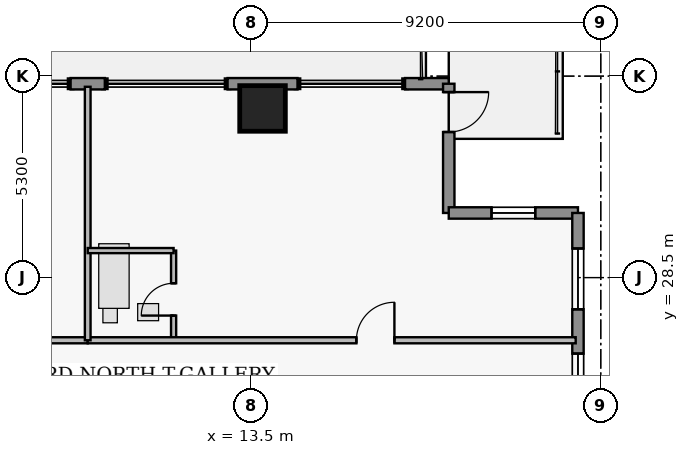
"""IFC4 building model, lengths in metres.
Left out: names, types, materials, properties, quantities, classifications, styles, units other than length and angle.
Written with IfcOpenShell. Run it as: python <this file> out.ifc"""

import sys

from ifc_helpers import new_model, si_unit, direction, frame, frame_2d, origin, origin_2d, place, context, subcontext, project, spatial, rectangle, extrude, element, fill, save


model = new_model("IFC4")
c1 = context("Model", 3, precision=1e-05, world=origin(), true_north=direction((0.0, 1.0)))
c2 = subcontext(c1, "Body", "Model", "MODEL_VIEW")
j1 = project(units=[si_unit("LENGTHUNIT", "METRE"), si_unit("PLANEANGLEUNIT", "RADIAN")], contexts=[c1])
p1 = place(None, origin())
s1 = spatial("IfcSite", under=j1, at=p1, CompositionType="ELEMENT")
p2 = place(p1, origin())
s2 = spatial("IfcBuilding", under=s1, at=p2, CompositionType="ELEMENT")
p3 = place(p2, frame((0.0, 0.0, 214.9)))
s3 = spatial("IfcBuildingStorey", under=s2, at=p3, CompositionType="ELEMENT", Elevation=214.9)
p4 = place(p3, frame((13.8, 32.95, 0.0), z_axis=(0.0, 0.0, 1.0), x_axis=(1.0, 0.0, 0.0)))
e1 = element("IfcColumn", 1, at=p4, inside=s3, PredefinedType="COLUMN", context=c2, shape_type="SweptSolid", body=[
    extrude(rectangle(XDim=1.2, YDim=1.2, at=origin_2d()), origin(), (0.0, 0.0, 1.0), 3.75),
])
p5 = place(p3, frame((8.75, 33.6, 0.0), z_axis=(0.0, 0.0, 1.0), x_axis=(1.0, 0.0, 0.0)))
e2 = element("IfcWall", 2, at=p5, inside=s3, PredefinedType="STANDARD", context=c2, shape_type="SweptSolid", body=[
    extrude(rectangle(XDim=0.9, YDim=0.3, at=frame_2d((0.45, 0.0))), origin(), (0.0, 0.0, 1.0), 3.53),
])
p6 = place(p3, frame((12.88, 33.6, 0.0), z_axis=(0.0, 0.0, 1.0), x_axis=(1.0, 0.0, 0.0)))
e3 = element("IfcWall", 3, at=p6, inside=s3, PredefinedType="STANDARD", context=c2, shape_type="SweptSolid", body=[
    extrude(rectangle(XDim=1.84, YDim=0.3, at=frame_2d((0.92, 0.0))), origin(), (0.0, 0.0, 1.0), 3.53),
])
p7 = place(p3, frame((17.55, 33.6, 0.0), z_axis=(0.0, 0.0, 1.0), x_axis=(1.0, 0.0, 0.0)))
e4 = element("IfcWall", 4, at=p7, inside=s3, PredefinedType="STANDARD", context=c2, shape_type="SweptSolid", body=[
    extrude(rectangle(XDim=1.15, YDim=0.3, at=frame_2d((0.575, 0.0))), origin(), (0.0, 0.0, 1.0), 3.53),
])
p8 = place(p3, frame((18.7, 33.6, 0.0), z_axis=(0.0, 0.0, 1.0), x_axis=(0.0, -1.0, 0.0)))
e5 = element("IfcWall", 5, at=p8, inside=s3, PredefinedType="STANDARD", context=c2, shape_type="SweptSolid", body=[
    extrude(rectangle(XDim=3.4, YDim=0.3, at=frame_2d((1.7, 0.0))), origin(), (0.0, 0.0, 1.0), 3.53),
])
p9 = place(p8, frame((0.22, 0.0, 0.0)))
e6 = element("IfcOpeningElement", 6, at=p9, cuts=e5, PredefinedType="OPENING", context=c2, shape_type="SweptSolid", body=[
    extrude(rectangle(XDim=1.05, YDim=2.2, at=frame_2d((0.525, 1.1))), frame((0.0, 0.16, 0.0), z_axis=(0.0, -1.0, 0.0), x_axis=(1.0, 0.0, 0.0)), (0.0, 0.0, 1.0), 0.32),
])
p10 = place(p3, frame((18.7, 30.2, 0.0), z_axis=(0.0, 0.0, 1.0), x_axis=(1.0, 0.0, 0.0)))
e7 = element("IfcWall", 7, at=p10, inside=s3, PredefinedType="STANDARD", context=c2, shape_type="SweptSolid", body=[
    extrude(rectangle(XDim=3.4, YDim=0.3, at=frame_2d((1.7, 0.0))), origin(), (0.0, 0.0, 1.0), 3.53),
])
p11 = place(p10, frame((1.125, 0.0, 1.25)))
e8 = element("IfcOpeningElement", 8, at=p11, cuts=e7, PredefinedType="OPENING", context=c2, shape_type="SweptSolid", body=[
    extrude(rectangle(XDim=1.15, YDim=1.55, at=frame_2d((0.575, 0.775))), frame((0.0, 0.16, 0.0), z_axis=(0.0, -1.0, 0.0), x_axis=(1.0, 0.0, 0.0)), (0.0, 0.0, 1.0), 0.32),
])
p12 = place(p3, frame((22.1, 30.2, 0.0), z_axis=(0.0, 0.0, 1.0), x_axis=(0.0, -1.0, 0.0)))
e9 = element("IfcWall", 9, at=p12, inside=s3, PredefinedType="STANDARD", context=c2, shape_type="SweptSolid", body=[
    extrude(rectangle(XDim=5.65, YDim=0.3, at=frame_2d((2.825, 0.0))), origin(), (0.0, 0.0, 1.0), 3.53),
])
p13 = place(p12, frame((0.935, 0.0, 0.85)))
e10 = element("IfcOpeningElement", 10, at=p13, cuts=e9, PredefinedType="OPENING", context=c2, shape_type="SweptSolid", body=[
    extrude(rectangle(XDim=1.6, YDim=1.8, at=frame_2d((0.8, 0.9))), frame((0.0, 0.16, 0.0), z_axis=(0.0, -1.0, 0.0), x_axis=(1.0, 0.0, 0.0)), (0.0, 0.0, 1.0), 0.32),
])
p14 = place(p12, frame((3.7, 0.0, 0.95)))
e11 = element("IfcOpeningElement", 11, at=p14, cuts=e9, PredefinedType="OPENING", context=c2, shape_type="SweptSolid", body=[
    extrude(rectangle(XDim=1.15, YDim=1.55, at=frame_2d((0.575, 0.775))), frame((0.0, 0.16, 0.0), z_axis=(0.0, -1.0, 0.0), x_axis=(1.0, 0.0, 0.0)), (0.0, 0.0, 1.0), 0.32),
])
p15 = place(p3, frame((-4.6, 26.85, 0.0), z_axis=(0.0, 0.0, 1.0), x_axis=(1.0, 0.0, 0.0)))
e12 = element("IfcWall", 12, at=p15, inside=s3, PredefinedType="PARTITIONING", context=c2, shape_type="SweptSolid", body=[
    extrude(rectangle(XDim=13.8, YDim=0.16, at=frame_2d((6.9, 0.0))), origin(), (0.0, 0.0, 1.0), 3.53),
])
p16 = place(p15, frame((7.55, 0.0, 0.0)))
e13 = element("IfcOpeningElement", 13, at=p16, cuts=e12, PredefinedType="OPENING", context=c2, shape_type="SweptSolid", body=[
    extrude(rectangle(XDim=1.0, YDim=2.15, at=frame_2d((0.5, 1.075))), frame((0.0, 0.09, 0.0), z_axis=(0.0, -1.0, 0.0), x_axis=(1.0, 0.0, 0.0)), (0.0, 0.0, 1.0), 0.18),
])
p17 = place(p3, frame((11.46, 26.85, 0.0), z_axis=(0.0, 0.0, 1.0), x_axis=(0.0, 1.0, 0.0)))
e14 = element("IfcWall", 14, at=p17, inside=s3, PredefinedType="PLUMBINGWALL", context=c2, shape_type="SweptSolid", body=[
    extrude(rectangle(XDim=2.36, YDim=0.135, at=frame_2d((1.18, 0.0))), origin(), (0.0, 0.0, 1.0), 3.53),
])
p18 = place(p17, frame((0.65, 0.0, 0.0)))
e15 = element("IfcOpeningElement", 15, at=p18, cuts=e14, PredefinedType="OPENING", context=c2, shape_type="SweptSolid", body=[
    extrude(rectangle(XDim=0.85, YDim=2.1, at=frame_2d((0.425, 1.05))), frame((0.0, 0.077, 0.0), z_axis=(0.0, -1.0, 0.0), x_axis=(1.0, 0.0, 0.0)), (0.0, 0.0, 1.0), 0.155),
])
p19 = place(p3, frame((9.2, 26.85, 0.0), z_axis=(0.0, 0.0, 1.0), x_axis=(1.0, 0.0, 0.0)))
e16 = element("IfcWall", 16, at=p19, inside=s3, PredefinedType="PARTITIONING", context=c2, shape_type="SweptSolid", body=[
    extrude(rectangle(XDim=12.84, YDim=0.16, at=frame_2d((6.42, 0.0))), origin(), (0.0, 0.0, 1.0), 3.53),
])
p20 = place(p19, frame((7.07, 0.0, 0.0)))
e17 = element("IfcOpeningElement", 17, at=p20, cuts=e16, PredefinedType="OPENING", context=c2, shape_type="SweptSolid", body=[
    extrude(rectangle(XDim=1.0, YDim=2.15, at=frame_2d((0.5, 1.075))), frame((0.0, 0.09, 0.0), z_axis=(0.0, -1.0, 0.0), x_axis=(1.0, 0.0, 0.0)), (0.0, 0.0, 1.0), 0.18),
])
p21 = place(p3, frame((9.2, 26.85, 0.0), z_axis=(0.0, 0.0, 1.0), x_axis=(0.0, 1.0, 0.0)))
e18 = element("IfcWall", 18, at=p21, inside=s3, PredefinedType="PARTITIONING", context=c2, shape_type="SweptSolid", body=[
    extrude(rectangle(XDim=6.67, YDim=0.15, at=frame_2d((3.335, 0.0))), origin(), (0.0, 0.0, 1.0), 3.53),
])
p22 = place(p3, frame((9.2, 29.21, 0.0), z_axis=(0.0, 0.0, 1.0), x_axis=(1.0, 0.0, 0.0)))
e19 = element("IfcWall", 19, at=p22, inside=s3, PredefinedType="PLUMBINGWALL", context=c2, shape_type="SweptSolid", body=[
    extrude(rectangle(XDim=2.26, YDim=0.135, at=frame_2d((1.13, 0.0))), origin(), (0.0, 0.0, 1.0), 3.53),
])
p23 = place(p9, origin())
e20 = element("IfcDoor", 20, at=p23, inside=s3, OperationType="SINGLE_SWING_LEFT", PredefinedType="DOOR", context=c2, shape_type="SweptSolid", body=[
    extrude(rectangle(XDim=1.05, YDim=2.2, at=frame_2d((0.525, 1.1))), frame((0.0, 0.025, 0.0), z_axis=(0.0, -1.0, 0.0), x_axis=(1.0, 0.0, 0.0)), (0.0, 0.0, 1.0), 0.05),
])
fill(e6, e20)
p24 = place(p11, origin())
e21 = element("IfcWindow", 21, at=p24, inside=s3, PartitioningType="SINGLE_PANEL", PredefinedType="WINDOW", context=c2, shape_type="SweptSolid", body=[
    extrude(rectangle(XDim=1.15, YDim=1.55, at=frame_2d((0.575, 0.775))), frame((0.0, 0.03, 0.0), z_axis=(0.0, -1.0, 0.0), x_axis=(1.0, 0.0, 0.0)), (0.0, 0.0, 1.0), 0.06),
])
fill(e8, e21)
p25 = place(p13, origin())
e22 = element("IfcWindow", 22, at=p25, inside=s3, PartitioningType="SINGLE_PANEL", PredefinedType="WINDOW", context=c2, shape_type="SweptSolid", body=[
    extrude(rectangle(XDim=1.6, YDim=1.8, at=frame_2d((0.8, 0.9))), frame((0.0, 0.03, 0.0), z_axis=(0.0, -1.0, 0.0), x_axis=(1.0, 0.0, 0.0)), (0.0, 0.0, 1.0), 0.06),
])
fill(e10, e22)
p26 = place(p14, origin())
e23 = element("IfcWindow", 23, at=p26, inside=s3, PartitioningType="SINGLE_PANEL", PredefinedType="WINDOW", context=c2, shape_type="SweptSolid", body=[
    extrude(rectangle(XDim=1.15, YDim=1.55, at=frame_2d((0.575, 0.775))), frame((0.0, 0.03, 0.0), z_axis=(0.0, -1.0, 0.0), x_axis=(1.0, 0.0, 0.0)), (0.0, 0.0, 1.0), 0.06),
])
fill(e11, e23)
p27 = place(p18, origin())
e24 = element("IfcDoor", 24, at=p27, inside=s3, OperationType="SINGLE_SWING_LEFT", PredefinedType="DOOR", context=c2, shape_type="SweptSolid", body=[
    extrude(rectangle(XDim=0.85, YDim=2.1, at=frame_2d((0.425, 1.05))), frame((0.0, 0.025, 0.0), z_axis=(0.0, -1.0, 0.0), x_axis=(1.0, 0.0, 0.0)), (0.0, 0.0, 1.0), 0.05),
])
fill(e15, e24)
p28 = place(p20, origin())
e25 = element("IfcDoor", 25, at=p28, inside=s3, OperationType="SINGLE_SWING_RIGHT", PredefinedType="DOOR", context=c2, shape_type="SweptSolid", body=[
    extrude(rectangle(XDim=1.0, YDim=2.15, at=frame_2d((0.5, 1.075))), frame((0.0, 0.025, 0.0), z_axis=(0.0, -1.0, 0.0), x_axis=(1.0, 0.0, 0.0)), (0.0, 0.0, 1.0), 0.05),
])
fill(e17, e25)
save(model, sys.argv[1])
